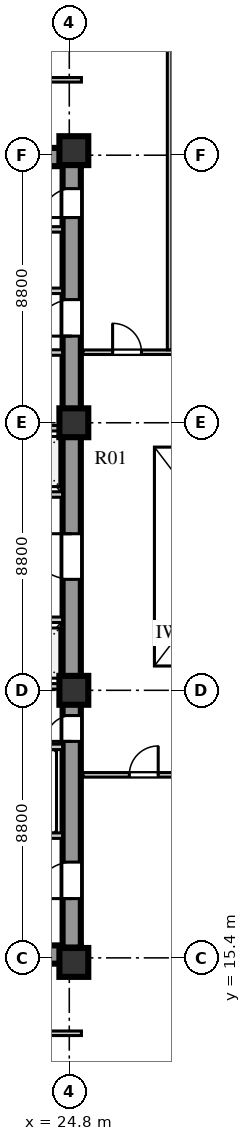
"""IFC4 building model, lengths in metres.
Left out: names, types, materials, properties, quantities, classifications, styles, units other than length and angle.
Written with IfcOpenShell. Run it as: python <this file> out.ifc"""

import sys

from ifc_helpers import new_model, si_unit, direction, frame, frame_2d, origin, origin_2d, place, context, subcontext, project, spatial, rectangle, extrude, element, fill, save


model = new_model("IFC4")
c1 = context("Model", 3, precision=1e-05, world=origin(), true_north=direction((0.0, 1.0)))
c2 = subcontext(c1, "Body", "Model", "MODEL_VIEW")
j1 = project(units=[si_unit("LENGTHUNIT", "METRE"), si_unit("PLANEANGLEUNIT", "RADIAN")], contexts=[c1])
p1 = place(None, origin())
s1 = spatial("IfcSite", under=j1, at=p1, CompositionType="ELEMENT")
p2 = place(p1, origin())
s2 = spatial("IfcBuilding", under=s1, at=p2, CompositionType="ELEMENT")
p3 = place(p2, frame((0.0, 0.0, 58.0)))
s3 = spatial("IfcBuildingStorey", under=s2, at=p3, CompositionType="ELEMENT", Elevation=58.0)
for number, where, z_axis, x_axis in (
    (1, (15.3, 15.51, 0.0), (0.0, 0.0, 1.0), (1.0, 0.0, 0.0)),
    (2, (15.3, 41.74, 0.0), (0.0, 0.0, 1.0), (1.0, 0.0, 0.0)),
):
    element("IfcWall", number, at=place(p3, frame(where, z_axis=z_axis, x_axis=x_axis)), inside=s3, PredefinedType="SHEAR", context=c2, shape_type="SweptSolid", body=[
        extrude(rectangle(XDim=9.88, YDim=0.6, at=frame_2d((4.94, 0.0))), origin(), (0.0, 0.0, 1.0), 3.72),
    ])
p4 = place(p3, frame((24.88, 15.74, 0.0), z_axis=(0.0, 0.0, 1.0), x_axis=(0.0, 1.0, 0.0)))
e3 = element("IfcWall", 3, at=p4, inside=s3, PredefinedType="SHEAR", context=c2, shape_type="SweptSolid", body=[
    extrude(rectangle(XDim=25.76, YDim=0.6, at=frame_2d((12.88, 0.0))), origin(), (0.0, 0.0, 1.0), 3.72),
])
p5 = place(p4, frame((1.61, 0.0, 0.0)))
e4 = element("IfcOpeningElement", 4, at=p5, cuts=e3, PredefinedType="OPENING", context=c2, shape_type="SweptSolid", body=[
    extrude(rectangle(XDim=1.2, YDim=2.1, at=frame_2d((0.6, 1.05))), frame((0.0, 0.31, 0.0), z_axis=(0.0, -1.0, 0.0), x_axis=(1.0, 0.0, 0.0)), (0.0, 0.0, 1.0), 0.62),
])
p6 = place(p4, frame((6.78, 0.0, 0.0)))
e5 = element("IfcOpeningElement", 5, at=p6, cuts=e3, PredefinedType="OPENING", context=c2, shape_type="SweptSolid", body=[
    extrude(rectangle(XDim=0.85, YDim=2.06, at=frame_2d((0.425, 1.03))), frame((0.0, 0.31, 0.0), z_axis=(0.0, -1.0, 0.0), x_axis=(1.0, 0.0, 0.0)), (0.0, 0.0, 1.0), 0.62),
])
p7 = place(p4, frame((12.11, 0.0, 0.0)))
e6 = element("IfcOpeningElement", 6, at=p7, cuts=e3, PredefinedType="OPENING", context=c2, shape_type="SweptSolid", body=[
    extrude(rectangle(XDim=1.5, YDim=2.12, at=frame_2d((0.75, 1.06))), frame((0.0, 0.31, 0.0), z_axis=(0.0, -1.0, 0.0), x_axis=(1.0, 0.0, 0.0)), (0.0, 0.0, 1.0), 0.62),
])
p8 = place(p4, frame((20.11, 0.0, 0.0)))
e7 = element("IfcOpeningElement", 7, at=p8, cuts=e3, PredefinedType="OPENING", context=c2, shape_type="SweptSolid", body=[
    extrude(rectangle(XDim=1.2, YDim=2.12, at=frame_2d((0.6, 1.06))), frame((0.0, 0.31, 0.0), z_axis=(0.0, -1.0, 0.0), x_axis=(1.0, 0.0, 0.0)), (0.0, 0.0, 1.0), 0.62),
])
p9 = place(p4, frame((24.01, 0.0, 0.0)))
e8 = element("IfcOpeningElement", 8, at=p9, cuts=e3, PredefinedType="OPENING", context=c2, shape_type="SweptSolid", body=[
    extrude(rectangle(XDim=0.95, YDim=2.1, at=frame_2d((0.475, 1.05))), frame((0.0, 0.31, 0.0), z_axis=(0.0, -1.0, 0.0), x_axis=(1.0, 0.0, 0.0)), (0.0, 0.0, 1.0), 0.62),
])
for number, where, z_axis, x_axis in (
    (9, (24.95, 15.25, 0.0), (0.0, 0.0, 1.0), (1.0, 0.0, 0.0)),
    (10, (24.95, 24.2, 0.0), (0.0, 0.0, 1.0), (1.0, 0.0, 0.0)),
    (11, (24.95, 33.0, 0.0), (0.0, 0.0, 1.0), (1.0, 0.0, 0.0)),
    (12, (24.95, 41.95, 0.0), (0.0, 0.0, 1.0), (1.0, 0.0, 0.0)),
):
    element("IfcColumn", number, at=place(p3, frame(where, z_axis=z_axis, x_axis=x_axis)), inside=s3, PredefinedType="COLUMN", context=c2, shape_type="SweptSolid", body=[
        extrude(rectangle(XDim=0.95, YDim=0.95, at=origin_2d()), origin(), (0.0, 0.0, 1.0), 3.72),
    ])
p10 = place(p3, frame((19.64, 19.42, 0.0), z_axis=(0.0, 0.0, 1.0), x_axis=(1.0, 0.0, 0.0)))
e13 = element("IfcWall", 13, at=p10, inside=s3, PredefinedType="SOLIDWALL", context=c2, shape_type="SweptSolid", body=[
    extrude(rectangle(XDim=4.94, YDim=0.18, at=frame_2d((2.47, 0.0))), origin(), (0.0, 0.0, 1.0), 3.72),
])
p11 = place(p10, frame((0.72, 0.0, 0.0)))
e14 = element("IfcOpeningElement", 14, at=p11, cuts=e13, PredefinedType="OPENING", context=c2, shape_type="SweptSolid", body=[
    extrude(rectangle(XDim=1.1, YDim=2.1, at=frame_2d((0.55, 1.05))), frame((0.0, 0.1, 0.0), z_axis=(0.0, -1.0, 0.0), x_axis=(1.0, 0.0, 0.0)), (0.0, 0.0, 1.0), 0.2),
])
p12 = place(p10, frame((3.02, 0.0, 0.0)))
e15 = element("IfcOpeningElement", 15, at=p12, cuts=e13, PredefinedType="OPENING", context=c2, shape_type="SweptSolid", body=[
    extrude(rectangle(XDim=1.1, YDim=2.1, at=frame_2d((0.55, 1.05))), frame((0.0, 0.1, 0.0), z_axis=(0.0, -1.0, 0.0), x_axis=(1.0, 0.0, 0.0)), (0.0, 0.0, 1.0), 0.2),
])
p13 = place(p3, frame((19.64, 22.34, 0.0), z_axis=(0.0, 0.0, 1.0), x_axis=(1.0, 0.0, 0.0)))
e16 = element("IfcWall", 16, at=p13, inside=s3, PredefinedType="SOLIDWALL", context=c2, shape_type="SweptSolid", body=[
    extrude(rectangle(XDim=4.94, YDim=0.18, at=frame_2d((2.47, 0.0))), origin(), (0.0, 0.0, 1.0), 3.72),
])
p14 = place(p3, frame((15.9, 26.52, 0.0), z_axis=(0.0, 0.0, 1.0), x_axis=(1.0, 0.0, 0.0)))
e17 = element("IfcWall", 17, at=p14, inside=s3, PredefinedType="SOLIDWALL", context=c2, shape_type="SweptSolid", body=[
    extrude(rectangle(XDim=8.68, YDim=0.18, at=frame_2d((4.34, 0.0))), origin(), (0.0, 0.0, 1.0), 3.72),
])
p15 = place(p14, frame((1.76, 0.0, 0.0)))
e18 = element("IfcOpeningElement", 18, at=p15, cuts=e17, PredefinedType="OPENING", context=c2, shape_type="SweptSolid", body=[
    extrude(rectangle(XDim=1.0, YDim=2.1, at=frame_2d((0.5, 1.05))), frame((0.0, 0.1, 0.0), z_axis=(0.0, -1.0, 0.0), x_axis=(1.0, 0.0, 0.0)), (0.0, 0.0, 1.0), 0.2),
])
p16 = place(p14, frame((3.6, 0.0, 0.0)))
e19 = element("IfcOpeningElement", 19, at=p16, cuts=e17, PredefinedType="OPENING", context=c2, shape_type="SweptSolid", body=[
    extrude(rectangle(XDim=1.0, YDim=2.1, at=frame_2d((0.5, 1.05))), frame((0.0, 0.1, 0.0), z_axis=(0.0, -1.0, 0.0), x_axis=(1.0, 0.0, 0.0)), (0.0, 0.0, 1.0), 0.2),
])
p17 = place(p14, frame((5.44, 0.0, 0.0)))
e20 = element("IfcOpeningElement", 20, at=p17, cuts=e17, PredefinedType="OPENING", context=c2, shape_type="SweptSolid", body=[
    extrude(rectangle(XDim=1.0, YDim=2.1, at=frame_2d((0.5, 1.05))), frame((0.0, 0.1, 0.0), z_axis=(0.0, -1.0, 0.0), x_axis=(1.0, 0.0, 0.0)), (0.0, 0.0, 1.0), 0.2),
])
p18 = place(p14, frame((7.28, 0.0, 0.0)))
e21 = element("IfcOpeningElement", 21, at=p18, cuts=e17, PredefinedType="OPENING", context=c2, shape_type="SweptSolid", body=[
    extrude(rectangle(XDim=1.0, YDim=2.1, at=frame_2d((0.5, 1.05))), frame((0.0, 0.1, 0.0), z_axis=(0.0, -1.0, 0.0), x_axis=(1.0, 0.0, 0.0)), (0.0, 0.0, 1.0), 0.2),
])
p19 = place(p3, frame((15.9, 24.33, 0.0), z_axis=(0.0, 0.0, 1.0), x_axis=(1.0, 0.0, 0.0)))
e22 = element("IfcWall", 22, at=p19, inside=s3, PredefinedType="SOLIDWALL", context=c2, shape_type="SweptSolid", body=[
    extrude(rectangle(XDim=8.68, YDim=0.18, at=frame_2d((4.34, 0.0))), origin(), (0.0, 0.0, 1.0), 3.02),
])
p20 = place(p3, frame((15.9, 30.64, 0.0), z_axis=(0.0, 0.0, 1.0), x_axis=(1.0, 0.0, 0.0)))
e23 = element("IfcWall", 23, at=p20, inside=s3, PredefinedType="SOLIDWALL", context=c2, shape_type="SweptSolid", body=[
    extrude(rectangle(XDim=8.68, YDim=0.18, at=frame_2d((4.34, 0.0))), origin(), (0.0, 0.0, 1.0), 3.72),
])
p21 = place(p20, frame((1.76, 0.0, 0.0)))
e24 = element("IfcOpeningElement", 24, at=p21, cuts=e23, PredefinedType="OPENING", context=c2, shape_type="SweptSolid", body=[
    extrude(rectangle(XDim=1.0, YDim=2.1, at=frame_2d((0.5, 1.05))), frame((0.0, 0.1, 0.0), z_axis=(0.0, -1.0, 0.0), x_axis=(1.0, 0.0, 0.0)), (0.0, 0.0, 1.0), 0.2),
])
p22 = place(p20, frame((3.6, 0.0, 0.0)))
e25 = element("IfcOpeningElement", 25, at=p22, cuts=e23, PredefinedType="OPENING", context=c2, shape_type="SweptSolid", body=[
    extrude(rectangle(XDim=1.0, YDim=2.1, at=frame_2d((0.5, 1.05))), frame((0.0, 0.1, 0.0), z_axis=(0.0, -1.0, 0.0), x_axis=(1.0, 0.0, 0.0)), (0.0, 0.0, 1.0), 0.2),
])
p23 = place(p20, frame((5.44, 0.0, 0.0)))
e26 = element("IfcOpeningElement", 26, at=p23, cuts=e23, PredefinedType="OPENING", context=c2, shape_type="SweptSolid", body=[
    extrude(rectangle(XDim=1.0, YDim=2.1, at=frame_2d((0.5, 1.05))), frame((0.0, 0.1, 0.0), z_axis=(0.0, -1.0, 0.0), x_axis=(1.0, 0.0, 0.0)), (0.0, 0.0, 1.0), 0.2),
])
p24 = place(p20, frame((7.28, 0.0, 0.0)))
e27 = element("IfcOpeningElement", 27, at=p24, cuts=e23, PredefinedType="OPENING", context=c2, shape_type="SweptSolid", body=[
    extrude(rectangle(XDim=1.0, YDim=2.1, at=frame_2d((0.5, 1.05))), frame((0.0, 0.1, 0.0), z_axis=(0.0, -1.0, 0.0), x_axis=(1.0, 0.0, 0.0)), (0.0, 0.0, 1.0), 0.2),
])
p25 = place(p3, frame((15.9, 32.82, 0.0), z_axis=(0.0, 0.0, 1.0), x_axis=(1.0, 0.0, 0.0)))
e28 = element("IfcWall", 28, at=p25, inside=s3, PredefinedType="SOLIDWALL", context=c2, shape_type="SweptSolid", body=[
    extrude(rectangle(XDim=8.68, YDim=0.18, at=frame_2d((4.34, 0.0))), origin(), (0.0, 0.0, 1.0), 3.02),
])
p26 = place(p3, frame((22.02, 35.31, 0.0), z_axis=(0.0, 0.0, 1.0), x_axis=(1.0, 0.0, 0.0)))
e29 = element("IfcWall", 29, at=p26, inside=s3, PredefinedType="SOLIDWALL", context=c2, shape_type="SweptSolid", body=[
    extrude(rectangle(XDim=2.56, YDim=0.18, at=frame_2d((1.28, 0.0))), origin(), (0.0, 0.0, 1.0), 3.72),
])
p27 = place(p26, frame((0.55, 0.0, 0.0)))
e30 = element("IfcOpeningElement", 30, at=p27, cuts=e29, PredefinedType="OPENING", context=c2, shape_type="SweptSolid", body=[
    extrude(rectangle(XDim=1.0, YDim=2.1, at=frame_2d((0.5, 1.05))), frame((0.0, 0.1, 0.0), z_axis=(0.0, -1.0, 0.0), x_axis=(1.0, 0.0, 0.0)), (0.0, 0.0, 1.0), 0.2),
])
p28 = place(p3, frame((19.64, 37.34, 0.0), z_axis=(0.0, 0.0, 1.0), x_axis=(1.0, 0.0, 0.0)))
e31 = element("IfcWall", 31, at=p28, inside=s3, PredefinedType="SOLIDWALL", context=c2, shape_type="SweptSolid", body=[
    extrude(rectangle(XDim=4.94, YDim=0.18, at=frame_2d((2.47, 0.0))), origin(), (0.0, 0.0, 1.0), 3.72),
])
p29 = place(p28, frame((0.45, 0.0, 0.0)))
e32 = element("IfcOpeningElement", 32, at=p29, cuts=e31, PredefinedType="OPENING", context=c2, shape_type="SweptSolid", body=[
    extrude(rectangle(XDim=1.0, YDim=2.1, at=frame_2d((0.5, 1.05))), frame((0.0, 0.1, 0.0), z_axis=(0.0, -1.0, 0.0), x_axis=(1.0, 0.0, 0.0)), (0.0, 0.0, 1.0), 0.2),
])
p30 = place(p28, frame((2.5, 0.0, 0.0)))
e33 = element("IfcOpeningElement", 33, at=p30, cuts=e31, PredefinedType="OPENING", context=c2, shape_type="SweptSolid", body=[
    extrude(rectangle(XDim=1.0, YDim=2.1, at=frame_2d((0.5, 1.05))), frame((0.0, 0.1, 0.0), z_axis=(0.0, -1.0, 0.0), x_axis=(1.0, 0.0, 0.0)), (0.0, 0.0, 1.0), 0.2),
])
p31 = place(p3, frame((19.64, 39.36, 0.0), z_axis=(0.0, 0.0, 1.0), x_axis=(1.0, 0.0, 0.0)))
e34 = element("IfcWall", 34, at=p31, inside=s3, PredefinedType="SOLIDWALL", context=c2, shape_type="SweptSolid", body=[
    extrude(rectangle(XDim=4.94, YDim=0.18, at=frame_2d((2.47, 0.0))), origin(), (0.0, 0.0, 1.0), 3.72),
])
p32 = place(p3, frame((25.25, 21.42, 0.0), z_axis=(0.0, 0.0, 1.0), x_axis=(1.0, 0.0, 0.0)))
e35 = element("IfcWall", 35, at=p32, inside=s3, PredefinedType="PARTITIONING", context=c2, shape_type="SweptSolid", body=[
    extrude(rectangle(XDim=12.87, YDim=0.15, at=frame_2d((6.435, 0.0))), origin(), (0.0, 0.0, 1.0), 3.32),
])
p33 = place(p32, frame((1.525, 0.0, 0.0)))
e36 = element("IfcOpeningElement", 36, at=p33, cuts=e35, PredefinedType="OPENING", context=c2, shape_type="SweptSolid", body=[
    extrude(rectangle(XDim=0.95, YDim=2.08, at=frame_2d((0.475, 1.04))), frame((0.0, 0.085, 0.0), z_axis=(0.0, -1.0, 0.0), x_axis=(1.0, 0.0, 0.0)), (0.0, 0.0, 1.0), 0.17),
])
p34 = place(p32, frame((5.775, 0.0, 0.0)))
e37 = element("IfcOpeningElement", 37, at=p34, cuts=e35, PredefinedType="OPENING", context=c2, shape_type="SweptSolid", body=[
    extrude(rectangle(XDim=0.95, YDim=2.08, at=frame_2d((0.475, 1.04))), frame((0.0, 0.085, 0.0), z_axis=(0.0, -1.0, 0.0), x_axis=(1.0, 0.0, 0.0)), (0.0, 0.0, 1.0), 0.17),
])
p35 = place(p32, frame((10.195, 0.0, 0.0)))
e38 = element("IfcOpeningElement", 38, at=p35, cuts=e35, PredefinedType="OPENING", context=c2, shape_type="SweptSolid", body=[
    extrude(rectangle(XDim=0.95, YDim=2.08, at=frame_2d((0.475, 1.04))), frame((0.0, 0.085, 0.0), z_axis=(0.0, -1.0, 0.0), x_axis=(1.0, 0.0, 0.0)), (0.0, 0.0, 1.0), 0.17),
])
p36 = place(p3, frame((25.25, 35.32, 0.0), z_axis=(0.0, 0.0, 1.0), x_axis=(1.0, 0.0, 0.0)))
e39 = element("IfcWall", 39, at=p36, inside=s3, PredefinedType="PARTITIONING", context=c2, shape_type="SweptSolid", body=[
    extrude(rectangle(XDim=9.47, YDim=0.15, at=frame_2d((4.735, 0.0))), origin(), (0.0, 0.0, 1.0), 3.72),
])
p37 = place(p36, frame((0.975, 0.0, 0.0)))
e40 = element("IfcOpeningElement", 40, at=p37, cuts=e39, PredefinedType="OPENING", context=c2, shape_type="SweptSolid", body=[
    extrude(rectangle(XDim=0.95, YDim=2.08, at=frame_2d((0.475, 1.04))), frame((0.0, 0.085, 0.0), z_axis=(0.0, -1.0, 0.0), x_axis=(1.0, 0.0, 0.0)), (0.0, 0.0, 1.0), 0.17),
])
p38 = place(p36, frame((4.025, 0.0, 0.0)))
e41 = element("IfcOpeningElement", 41, at=p38, cuts=e39, PredefinedType="OPENING", context=c2, shape_type="SweptSolid", body=[
    extrude(rectangle(XDim=0.95, YDim=2.08, at=frame_2d((0.475, 1.04))), frame((0.0, 0.085, 0.0), z_axis=(0.0, -1.0, 0.0), x_axis=(1.0, 0.0, 0.0)), (0.0, 0.0, 1.0), 0.17),
])
p39 = place(p36, frame((7.315, 0.0, 0.0)))
e42 = element("IfcOpeningElement", 42, at=p39, cuts=e39, PredefinedType="OPENING", context=c2, shape_type="SweptSolid", body=[
    extrude(rectangle(XDim=0.95, YDim=2.08, at=frame_2d((0.475, 1.04))), frame((0.0, 0.085, 0.0), z_axis=(0.0, -1.0, 0.0), x_axis=(1.0, 0.0, 0.0)), (0.0, 0.0, 1.0), 0.17),
])
p40 = place(p3, frame((10.5, 12.92, 0.0), z_axis=(0.0, 0.0, 1.0), x_axis=(1.0, 0.0, 0.0)))
e43 = element("IfcWall", 43, at=p40, inside=s3, PredefinedType="PARTITIONING", context=c2, shape_type="SweptSolid", body=[
    extrude(rectangle(XDim=14.7, YDim=0.15, at=frame_2d((7.35, 0.0))), origin(), (0.0, 0.0, 1.0), 3.72),
])
p41 = place(p40, frame((6.2, 0.0, 0.0)))
e44 = element("IfcOpeningElement", 44, at=p41, cuts=e43, PredefinedType="OPENING", context=c2, shape_type="SweptSolid", body=[
    extrude(rectangle(XDim=1.0, YDim=2.08, at=frame_2d((0.5, 1.04))), frame((0.0, 0.085, 0.0), z_axis=(0.0, -1.0, 0.0), x_axis=(1.0, 0.0, 0.0)), (0.0, 0.0, 1.0), 0.17),
])
p42 = place(p3, frame((10.5, 44.28, 0.0), z_axis=(0.0, 0.0, 1.0), x_axis=(1.0, 0.0, 0.0)))
e45 = element("IfcWall", 45, at=p42, inside=s3, PredefinedType="PARTITIONING", context=c2, shape_type="SweptSolid", body=[
    extrude(rectangle(XDim=14.7, YDim=0.15, at=frame_2d((7.35, 0.0))), origin(), (0.0, 0.0, 1.0), 3.72),
])
p43 = place(p42, frame((6.2, 0.0, 0.0)))
e46 = element("IfcOpeningElement", 46, at=p43, cuts=e45, PredefinedType="OPENING", context=c2, shape_type="SweptSolid", body=[
    extrude(rectangle(XDim=1.0, YDim=2.08, at=frame_2d((0.5, 1.04))), frame((0.0, 0.085, 0.0), z_axis=(0.0, -1.0, 0.0), x_axis=(1.0, 0.0, 0.0)), (0.0, 0.0, 1.0), 0.17),
])
p44 = place(p3, frame((28.1, 35.4, 0.0), z_axis=(0.0, 0.0, 1.0), x_axis=(0.0, 1.0, 0.0)))
e47 = element("IfcWall", 47, at=p44, inside=s3, PredefinedType="PARTITIONING", context=c2, shape_type="SweptSolid", body=[
    extrude(rectangle(XDim=14.92, YDim=0.15, at=frame_2d((7.46, 0.0))), origin(), (0.0, 0.0, 1.0), 3.72),
])
p45 = place(p5, frame((1.2, 0.0, 0.0), z_axis=(0.0, 0.0, 1.0), x_axis=(-1.0, 0.0, 0.0)))
e48 = element("IfcDoor", 48, at=p45, inside=s3, OperationType="SINGLE_SWING_RIGHT", PredefinedType="DOOR", context=c2, shape_type="SweptSolid", body=[
    extrude(rectangle(XDim=1.2, YDim=2.1, at=frame_2d((0.6, 1.05))), frame((0.0, 0.025, 0.0), z_axis=(0.0, -1.0, 0.0), x_axis=(1.0, 0.0, 0.0)), (0.0, 0.0, 1.0), 0.05),
])
fill(e4, e48)
p46 = place(p6, frame((0.85, 0.0, 0.0), z_axis=(0.0, 0.0, 1.0), x_axis=(-1.0, 0.0, 0.0)))
e49 = element("IfcDoor", 49, at=p46, inside=s3, OperationType="SINGLE_SWING_RIGHT", PredefinedType="DOOR", context=c2, shape_type="SweptSolid", body=[
    extrude(rectangle(XDim=0.85, YDim=2.06, at=frame_2d((0.425, 1.03))), frame((0.0, 0.025, 0.0), z_axis=(0.0, -1.0, 0.0), x_axis=(1.0, 0.0, 0.0)), (0.0, 0.0, 1.0), 0.05),
])
fill(e5, e49)
p47 = place(p7, frame((1.5, 0.0, 0.0), z_axis=(0.0, 0.0, 1.0), x_axis=(-1.0, 0.0, 0.0)))
e50 = element("IfcDoor", 50, at=p47, inside=s3, OperationType="SINGLE_SWING_LEFT", PredefinedType="DOOR", context=c2, shape_type="SweptSolid", body=[
    extrude(rectangle(XDim=1.5, YDim=2.12, at=frame_2d((0.75, 1.06))), frame((0.0, 0.025, 0.0), z_axis=(0.0, -1.0, 0.0), x_axis=(1.0, 0.0, 0.0)), (0.0, 0.0, 1.0), 0.05),
])
fill(e6, e50)
p48 = place(p8, frame((1.2, 0.0, 0.0), z_axis=(0.0, 0.0, 1.0), x_axis=(-1.0, 0.0, 0.0)))
e51 = element("IfcDoor", 51, at=p48, inside=s3, OperationType="SINGLE_SWING_RIGHT", PredefinedType="DOOR", context=c2, shape_type="SweptSolid", body=[
    extrude(rectangle(XDim=1.2, YDim=2.12, at=frame_2d((0.6, 1.06))), frame((0.0, 0.025, 0.0), z_axis=(0.0, -1.0, 0.0), x_axis=(1.0, 0.0, 0.0)), (0.0, 0.0, 1.0), 0.05),
])
fill(e7, e51)
p49 = place(p9, frame((0.95, 0.0, 0.0), z_axis=(0.0, 0.0, 1.0), x_axis=(-1.0, 0.0, 0.0)))
e52 = element("IfcDoor", 52, at=p49, inside=s3, OperationType="SINGLE_SWING_RIGHT", PredefinedType="DOOR", context=c2, shape_type="SweptSolid", body=[
    extrude(rectangle(XDim=0.95, YDim=2.1, at=frame_2d((0.475, 1.05))), frame((0.0, 0.025, 0.0), z_axis=(0.0, -1.0, 0.0), x_axis=(1.0, 0.0, 0.0)), (0.0, 0.0, 1.0), 0.05),
])
fill(e8, e52)
p50 = place(p33, frame((0.95, 0.0, 0.0), z_axis=(0.0, 0.0, 1.0), x_axis=(-1.0, 0.0, 0.0)))
e53 = element("IfcDoor", 53, at=p50, inside=s3, OperationType="SINGLE_SWING_LEFT", PredefinedType="DOOR", context=c2, shape_type="SweptSolid", body=[
    extrude(rectangle(XDim=0.95, YDim=2.08, at=frame_2d((0.475, 1.04))), frame((0.0, 0.025, 0.0), z_axis=(0.0, -1.0, 0.0), x_axis=(1.0, 0.0, 0.0)), (0.0, 0.0, 1.0), 0.05),
])
fill(e36, e53)
p51 = place(p37, origin())
e54 = element("IfcDoor", 54, at=p51, inside=s3, OperationType="SINGLE_SWING_LEFT", PredefinedType="DOOR", context=c2, shape_type="SweptSolid", body=[
    extrude(rectangle(XDim=0.95, YDim=2.08, at=frame_2d((0.475, 1.04))), frame((0.0, 0.025, 0.0), z_axis=(0.0, -1.0, 0.0), x_axis=(1.0, 0.0, 0.0)), (0.0, 0.0, 1.0), 0.05),
])
fill(e40, e54)
save(model, sys.argv[1])
